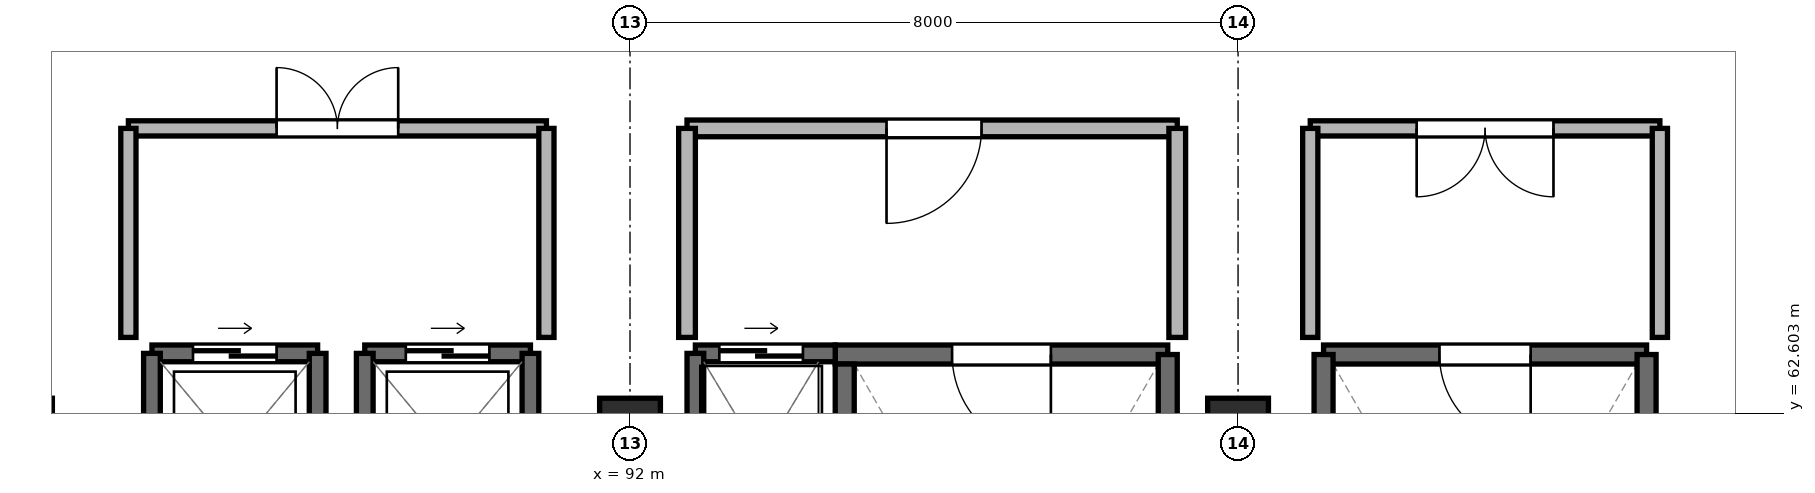
"""IFC4 building model, lengths in metres.
Left out: names, types, materials, properties, quantities, classifications, styles, units other than length and angle.
Written with IfcOpenShell. Run it as: python <this file> out.ifc"""

import sys

from ifc_helpers import new_model, si_unit, direction, frame, frame_2d, origin, origin_2d, place, context, subcontext, project, spatial, rectangle, extrude, element, fill, save


model = new_model("IFC4")
c1 = context("Model", 3, precision=1e-05, world=origin(), true_north=direction((0.0, 1.0)))
c2 = subcontext(c1, "Body", "Model", "MODEL_VIEW")
j1 = project(units=[si_unit("LENGTHUNIT", "METRE"), si_unit("PLANEANGLEUNIT", "RADIAN")], contexts=[c1])
p1 = place(None, origin())
s1 = spatial("IfcSite", under=j1, at=p1, CompositionType="ELEMENT")
p2 = place(p1, origin())
s2 = spatial("IfcBuilding", under=s1, at=p2, CompositionType="ELEMENT")
p3 = place(p2, frame((0.0, 0.0, 37.3)))
s3 = spatial("IfcBuildingStorey", under=s2, at=p3, CompositionType="ELEMENT", Elevation=37.3)
for number, where, z_axis, x_axis in (
    (1, (84.0, 62.4, -0.25), (0.0, 0.0, 1.0), (1.0, 0.0, 0.0)),
    (2, (92.0, 62.4, -0.25), (0.0, 0.0, 1.0), (1.0, 0.0, 0.0)),
    (3, (100.0, 62.4, -0.25), (0.0, 0.0, 1.0), (1.0, 0.0, 0.0)),
):
    element("IfcColumn", number, at=place(p3, frame(where, z_axis=z_axis, x_axis=x_axis)), inside=s3, PredefinedType="COLUMN", context=c2, shape_type="SweptSolid", body=[
        extrude(rectangle(XDim=0.8, YDim=0.8, at=origin_2d()), origin(), (0.0, 0.0, 1.0), 3.26),
    ])
p4 = place(p3, frame((99.075, 63.375, 0.0), z_axis=(0.0, 0.0, 1.0), x_axis=(-1.0, 0.0, 0.0)))
e4 = element("IfcWall", 4, at=p4, inside=s3, PredefinedType="SHEAR", context=c2, shape_type="SweptSolid", body=[
    extrude(rectangle(XDim=4.375, YDim=0.25, at=frame_2d((2.188, 0.0))), origin(), (0.0, 0.0, 1.0), 3.01),
])
p5 = place(p4, frame((1.538, 0.0, 0.0)))
e5 = element("IfcOpeningElement", 5, at=p5, cuts=e4, PredefinedType="OPENING", context=c2, shape_type="SweptSolid", body=[
    extrude(rectangle(XDim=1.3, YDim=2.2, at=frame_2d((0.65, 1.1))), frame((0.0, 0.137, 0.0), z_axis=(0.0, -1.0, 0.0), x_axis=(1.0, 0.0, 0.0)), (0.0, 0.0, 1.0), 0.274),
])
p6 = place(p3, frame((94.825, 63.25, 0.0), z_axis=(0.0, 0.0, 1.0), x_axis=(0.0, -1.0, 0.0)))
e6 = element("IfcWall", 6, at=p6, inside=s3, PredefinedType="SHEAR", context=c2, shape_type="SweptSolid", body=[
    extrude(rectangle(XDim=7.075, YDim=0.25, at=frame_2d((3.538, 0.0))), origin(), (0.0, 0.0, 1.0), 3.01),
])
p7 = place(p3, frame((99.075, 56.175, 0.0), z_axis=(0.0, 0.0, 1.0), x_axis=(0.0, 1.0, 0.0)))
e7 = element("IfcWall", 7, at=p7, inside=s3, PredefinedType="SHEAR", context=c2, shape_type="SweptSolid", body=[
    extrude(rectangle(XDim=7.2, YDim=0.25, at=frame_2d((3.6, 0.0))), origin(), (0.0, 0.0, 1.0), 3.01),
])
p8 = place(p3, frame((105.375, 63.375, 0.0), z_axis=(0.0, 0.0, 1.0), x_axis=(-1.0, 0.0, 0.0)))
e8 = element("IfcWall", 8, at=p8, inside=s3, PredefinedType="SHEAR", context=c2, shape_type="SweptSolid", body=[
    extrude(rectangle(XDim=4.25, YDim=0.25, at=frame_2d((2.125, 0.0))), origin(), (0.0, 0.0, 1.0), 3.01),
])
p9 = place(p8, frame((1.525, 0.0, 0.0)))
e9 = element("IfcOpeningElement", 9, at=p9, cuts=e8, PredefinedType="OPENING", context=c2, shape_type="SweptSolid", body=[
    extrude(rectangle(XDim=1.2, YDim=2.2, at=frame_2d((0.6, 1.1))), frame((0.0, 0.137, 0.0), z_axis=(0.0, -1.0, 0.0), x_axis=(1.0, 0.0, 0.0)), (0.0, 0.0, 1.0), 0.274),
])
for number, where, z_axis, x_axis in (
    (10, (101.125, 63.375, 0.0), (0.0, 0.0, 1.0), (0.0, -1.0, 0.0)),
    (11, (105.375, 56.175, 0.0), (0.0, 0.0, 1.0), (0.0, 1.0, 0.0)),
):
    element("IfcWall", number, at=place(p3, frame(where, z_axis=z_axis, x_axis=x_axis)), inside=s3, PredefinedType="SHEAR", context=c2, shape_type="SweptSolid", body=[
        extrude(rectangle(XDim=7.2, YDim=0.25, at=frame_2d((3.6, 0.0))), origin(), (0.0, 0.0, 1.0), 3.01),
    ])
p10 = place(p3, frame((94.7, 63.39, 0.0), z_axis=(0.0, 0.0, 1.0), x_axis=(-1.0, 0.0, 0.0)))
e12 = element("IfcWall", 12, at=p10, inside=s3, PredefinedType="SHEAR", context=c2, shape_type="SweptSolid", body=[
    extrude(rectangle(XDim=1.84, YDim=0.22, at=frame_2d((0.92, 0.0))), origin(), (0.0, 0.0, 1.0), 3.01),
])
p11 = place(p10, frame((0.425, 0.0, 0.0)))
e13 = element("IfcOpeningElement", 13, at=p11, cuts=e12, PredefinedType="OPENING", context=c2, shape_type="SweptSolid", body=[
    extrude(rectangle(XDim=1.1, YDim=2.2, at=frame_2d((0.55, 1.1))), frame((0.0, 0.122, 0.0), z_axis=(0.0, -1.0, 0.0), x_axis=(1.0, 0.0, 0.0)), (0.0, 0.0, 1.0), 0.244),
])
p12 = place(p3, frame((92.86, 63.39, 0.0), z_axis=(0.0, 0.0, 1.0), x_axis=(0.0, -1.0, 0.0)))
e14 = element("IfcWall", 14, at=p12, inside=s3, PredefinedType="SHEAR", context=c2, shape_type="SweptSolid", body=[
    extrude(rectangle(XDim=2.73, YDim=0.22, at=frame_2d((1.365, 0.0))), origin(), (0.0, 0.0, 1.0), 3.01),
])
p13 = place(p3, frame((87.89, 63.39, 0.0), z_axis=(0.0, 0.0, 1.0), x_axis=(-1.0, 0.0, 0.0)))
e15 = element("IfcWall", 15, at=p13, inside=s3, PredefinedType="SHEAR", context=c2, shape_type="SweptSolid", body=[
    extrude(rectangle(XDim=2.18, YDim=0.22, at=frame_2d((1.09, 0.0))), origin(), (0.0, 0.0, 1.0), 3.01),
])
p14 = place(p13, frame((0.54, 0.0, 0.0)))
e16 = element("IfcOpeningElement", 16, at=p14, cuts=e15, PredefinedType="OPENING", context=c2, shape_type="SweptSolid", body=[
    extrude(rectangle(XDim=1.1, YDim=2.2, at=frame_2d((0.55, 1.1))), frame((0.0, 0.122, 0.0), z_axis=(0.0, -1.0, 0.0), x_axis=(1.0, 0.0, 0.0)), (0.0, 0.0, 1.0), 0.244),
])
for number, where, z_axis, x_axis in (
    (17, (85.71, 63.39, 0.0), (0.0, 0.0, 1.0), (0.0, -1.0, 0.0)),
    (18, (87.89, 60.81, 0.0), (0.0, 0.0, 1.0), (0.0, 1.0, 0.0)),
):
    element("IfcWall", number, at=place(p3, frame(where, z_axis=z_axis, x_axis=x_axis)), inside=s3, PredefinedType="SHEAR", context=c2, shape_type="SweptSolid", body=[
        extrude(rectangle(XDim=2.58, YDim=0.22, at=frame_2d((1.29, 0.0))), origin(), (0.0, 0.0, 1.0), 3.01),
    ])
p15 = place(p3, frame((90.69, 63.39, 0.0), z_axis=(0.0, 0.0, 1.0), x_axis=(-1.0, 0.0, 0.0)))
e19 = element("IfcWall", 19, at=p15, inside=s3, PredefinedType="SHEAR", context=c2, shape_type="SweptSolid", body=[
    extrude(rectangle(XDim=2.18, YDim=0.22, at=frame_2d((1.09, 0.0))), origin(), (0.0, 0.0, 1.0), 3.01),
])
p16 = place(p15, frame((0.54, 0.0, 0.0)))
e20 = element("IfcOpeningElement", 20, at=p16, cuts=e19, PredefinedType="OPENING", context=c2, shape_type="SweptSolid", body=[
    extrude(rectangle(XDim=1.1, YDim=2.2, at=frame_2d((0.55, 1.1))), frame((0.0, 0.122, 0.0), z_axis=(0.0, -1.0, 0.0), x_axis=(1.0, 0.0, 0.0)), (0.0, 0.0, 1.0), 0.244),
])
for number, where, z_axis, x_axis in (
    (21, (88.51, 63.39, 0.0), (0.0, 0.0, 1.0), (0.0, -1.0, 0.0)),
    (22, (90.69, 60.81, 0.0), (0.0, 0.0, 1.0), (0.0, 1.0, 0.0)),
):
    element("IfcWall", number, at=place(p3, frame(where, z_axis=z_axis, x_axis=x_axis)), inside=s3, PredefinedType="SHEAR", context=c2, shape_type="SweptSolid", body=[
        extrude(rectangle(XDim=2.58, YDim=0.22, at=frame_2d((1.29, 0.0))), origin(), (0.0, 0.0, 1.0), 3.01),
    ])
p17 = place(p3, frame((92.75, 66.35, 0.0), z_axis=(0.0, 0.0, 1.0), x_axis=(1.0, 0.0, 0.0)))
e23 = element("IfcWall", 23, at=p17, inside=s3, PredefinedType="PARTITIONING", context=c2, shape_type="SweptSolid", body=[
    extrude(rectangle(XDim=6.45, YDim=0.22, at=frame_2d((3.225, 0.0))), origin(), (0.0, 0.0, 1.0), 2.53),
])
p18 = place(p17, frame((2.625, 0.0, 0.0)))
e24 = element("IfcOpeningElement", 24, at=p18, cuts=e23, PredefinedType="OPENING", context=c2, shape_type="SweptSolid", body=[
    extrude(rectangle(XDim=1.25, YDim=2.2, at=frame_2d((0.625, 1.1))), frame((0.0, 0.122, 0.0), z_axis=(0.0, -1.0, 0.0), x_axis=(1.0, 0.0, 0.0)), (0.0, 0.0, 1.0), 0.244),
])
for number, where, z_axis, x_axis in (
    (25, (92.75, 63.6, 0.0), (0.0, 0.0, 1.0), (0.0, 1.0, 0.0)),
    (26, (99.2, 63.6, 0.0), (0.0, 0.0, 1.0), (0.0, 1.0, 0.0)),
):
    element("IfcWall", number, at=place(p3, frame(where, z_axis=z_axis, x_axis=x_axis)), inside=s3, PredefinedType="PARTITIONING", context=c2, shape_type="SweptSolid", body=[
        extrude(rectangle(XDim=2.75, YDim=0.22, at=frame_2d((1.375, 0.0))), origin(), (0.0, 0.0, 1.0), 2.53),
    ])
p19 = place(p3, frame((85.4, 66.35, 0.0), z_axis=(0.0, 0.0, 1.0), x_axis=(1.0, 0.0, 0.0)))
e27 = element("IfcWall", 27, at=p19, inside=s3, PredefinedType="PARTITIONING", context=c2, shape_type="SweptSolid", body=[
    extrude(rectangle(XDim=5.5, YDim=0.2, at=frame_2d((2.75, 0.0))), origin(), (0.0, 0.0, 1.0), 2.53),
])
p20 = place(p19, frame((1.95, 0.0, 0.0)))
e28 = element("IfcOpeningElement", 28, at=p20, cuts=e27, PredefinedType="OPENING", context=c2, shape_type="SweptSolid", body=[
    extrude(rectangle(XDim=1.6, YDim=2.2, at=frame_2d((0.8, 1.1))), frame((0.0, 0.112, 0.0), z_axis=(0.0, -1.0, 0.0), x_axis=(1.0, 0.0, 0.0)), (0.0, 0.0, 1.0), 0.224),
])
for number, where, z_axis, x_axis in (
    (29, (85.4, 63.6, 0.0), (0.0, 0.0, 1.0), (0.0, 1.0, 0.0)),
    (30, (90.9, 63.6, 0.0), (0.0, 0.0, 1.0), (0.0, 1.0, 0.0)),
):
    element("IfcWall", number, at=place(p3, frame(where, z_axis=z_axis, x_axis=x_axis)), inside=s3, PredefinedType="PARTITIONING", context=c2, shape_type="SweptSolid", body=[
        extrude(rectangle(XDim=2.75, YDim=0.2, at=frame_2d((1.375, 0.0))), origin(), (0.0, 0.0, 1.0), 2.53),
    ])
p21 = place(p3, frame((100.95, 66.35, 0.0), z_axis=(0.0, 0.0, 1.0), x_axis=(1.0, 0.0, 0.0)))
e31 = element("IfcWall", 31, at=p21, inside=s3, PredefinedType="PARTITIONING", context=c2, shape_type="SweptSolid", body=[
    extrude(rectangle(XDim=4.6, YDim=0.2, at=frame_2d((2.3, 0.0))), origin(), (0.0, 0.0, 1.0), 2.53),
])
p22 = place(p21, frame((1.4, 0.0, 0.0)))
e32 = element("IfcOpeningElement", 32, at=p22, cuts=e31, PredefinedType="OPENING", context=c2, shape_type="SweptSolid", body=[
    extrude(rectangle(XDim=1.8, YDim=2.2, at=frame_2d((0.9, 1.1))), frame((0.0, 0.112, 0.0), z_axis=(0.0, -1.0, 0.0), x_axis=(1.0, 0.0, 0.0)), (0.0, 0.0, 1.0), 0.224),
])
for number, where, z_axis, x_axis in (
    (33, (100.95, 63.6, 0.0), (0.0, 0.0, 1.0), (0.0, 1.0, 0.0)),
    (34, (105.55, 63.6, 0.0), (0.0, 0.0, 1.0), (0.0, 1.0, 0.0)),
):
    element("IfcWall", number, at=place(p3, frame(where, z_axis=z_axis, x_axis=x_axis)), inside=s3, PredefinedType="PARTITIONING", context=c2, shape_type="SweptSolid", body=[
        extrude(rectangle(XDim=2.75, YDim=0.2, at=frame_2d((1.375, 0.0))), origin(), (0.0, 0.0, 1.0), 2.53),
    ])
p23 = place(p5, origin())
e35 = element("IfcDoor", 35, at=p23, inside=s3, OperationType="SINGLE_SWING_LEFT", PredefinedType="DOOR", context=c2, shape_type="SweptSolid", body=[
    extrude(rectangle(XDim=1.3, YDim=2.2, at=frame_2d((0.65, 1.1))), frame((0.0, 0.025, 0.0), z_axis=(0.0, -1.0, 0.0), x_axis=(1.0, 0.0, 0.0)), (0.0, 0.0, 1.0), 0.05),
])
fill(e5, e35)
p24 = place(p9, origin())
e36 = element("IfcDoor", 36, at=p24, inside=s3, OperationType="SINGLE_SWING_LEFT", PredefinedType="DOOR", context=c2, shape_type="SweptSolid", body=[
    extrude(rectangle(XDim=1.2, YDim=2.2, at=frame_2d((0.6, 1.1))), frame((0.0, 0.025, 0.0), z_axis=(0.0, -1.0, 0.0), x_axis=(1.0, 0.0, 0.0)), (0.0, 0.0, 1.0), 0.05),
])
fill(e9, e36)
p25 = place(p11, origin())
e37 = element("IfcDoor", 37, at=p25, inside=s3, OperationType="SLIDING_TO_LEFT", PredefinedType="DOOR", context=c2, shape_type="SweptSolid", body=[
    extrude(rectangle(XDim=1.1, YDim=2.2, at=frame_2d((0.55, 1.1))), frame((0.0, 0.025, 0.0), z_axis=(0.0, -1.0, 0.0), x_axis=(1.0, 0.0, 0.0)), (0.0, 0.0, 1.0), 0.05),
])
fill(e13, e37)
p26 = place(p14, origin())
e38 = element("IfcDoor", 38, at=p26, inside=s3, OperationType="SLIDING_TO_LEFT", PredefinedType="DOOR", context=c2, shape_type="SweptSolid", body=[
    extrude(rectangle(XDim=1.1, YDim=2.2, at=frame_2d((0.55, 1.1))), frame((0.0, 0.025, 0.0), z_axis=(0.0, -1.0, 0.0), x_axis=(1.0, 0.0, 0.0)), (0.0, 0.0, 1.0), 0.05),
])
fill(e16, e38)
p27 = place(p16, origin())
e39 = element("IfcDoor", 39, at=p27, inside=s3, OperationType="SLIDING_TO_LEFT", PredefinedType="DOOR", context=c2, shape_type="SweptSolid", body=[
    extrude(rectangle(XDim=1.1, YDim=2.2, at=frame_2d((0.55, 1.1))), frame((0.0, 0.025, 0.0), z_axis=(0.0, -1.0, 0.0), x_axis=(1.0, 0.0, 0.0)), (0.0, 0.0, 1.0), 0.05),
])
fill(e20, e39)
p28 = place(p18, frame((1.25, 0.0, 0.0), z_axis=(0.0, 0.0, 1.0), x_axis=(-1.0, 0.0, 0.0)))
e40 = element("IfcDoor", 40, at=p28, inside=s3, OperationType="SINGLE_SWING_LEFT", PredefinedType="DOOR", context=c2, shape_type="SweptSolid", body=[
    extrude(rectangle(XDim=1.25, YDim=2.2, at=frame_2d((0.625, 1.1))), frame((0.0, 0.025, 0.0), z_axis=(0.0, -1.0, 0.0), x_axis=(1.0, 0.0, 0.0)), (0.0, 0.0, 1.0), 0.05),
])
fill(e24, e40)
p29 = place(p20, origin())
e41 = element("IfcDoor", 41, at=p29, inside=s3, OperationType="DOUBLE_DOOR_SINGLE_SWING", PredefinedType="DOOR", context=c2, shape_type="SweptSolid", body=[
    extrude(rectangle(XDim=1.6, YDim=2.2, at=frame_2d((0.8, 1.1))), frame((0.0, 0.025, 0.0), z_axis=(0.0, -1.0, 0.0), x_axis=(1.0, 0.0, 0.0)), (0.0, 0.0, 1.0), 0.05),
])
fill(e28, e41)
p30 = place(p22, frame((1.8, 0.0, 0.0), z_axis=(0.0, 0.0, 1.0), x_axis=(-1.0, 0.0, 0.0)))
e42 = element("IfcDoor", 42, at=p30, inside=s3, OperationType="DOUBLE_DOOR_SINGLE_SWING", PredefinedType="DOOR", context=c2, shape_type="SweptSolid", body=[
    extrude(rectangle(XDim=1.8, YDim=2.2, at=frame_2d((0.9, 1.1))), frame((0.0, 0.025, 0.0), z_axis=(0.0, -1.0, 0.0), x_axis=(1.0, 0.0, 0.0)), (0.0, 0.0, 1.0), 0.05),
])
fill(e32, e42)
save(model, sys.argv[1])
